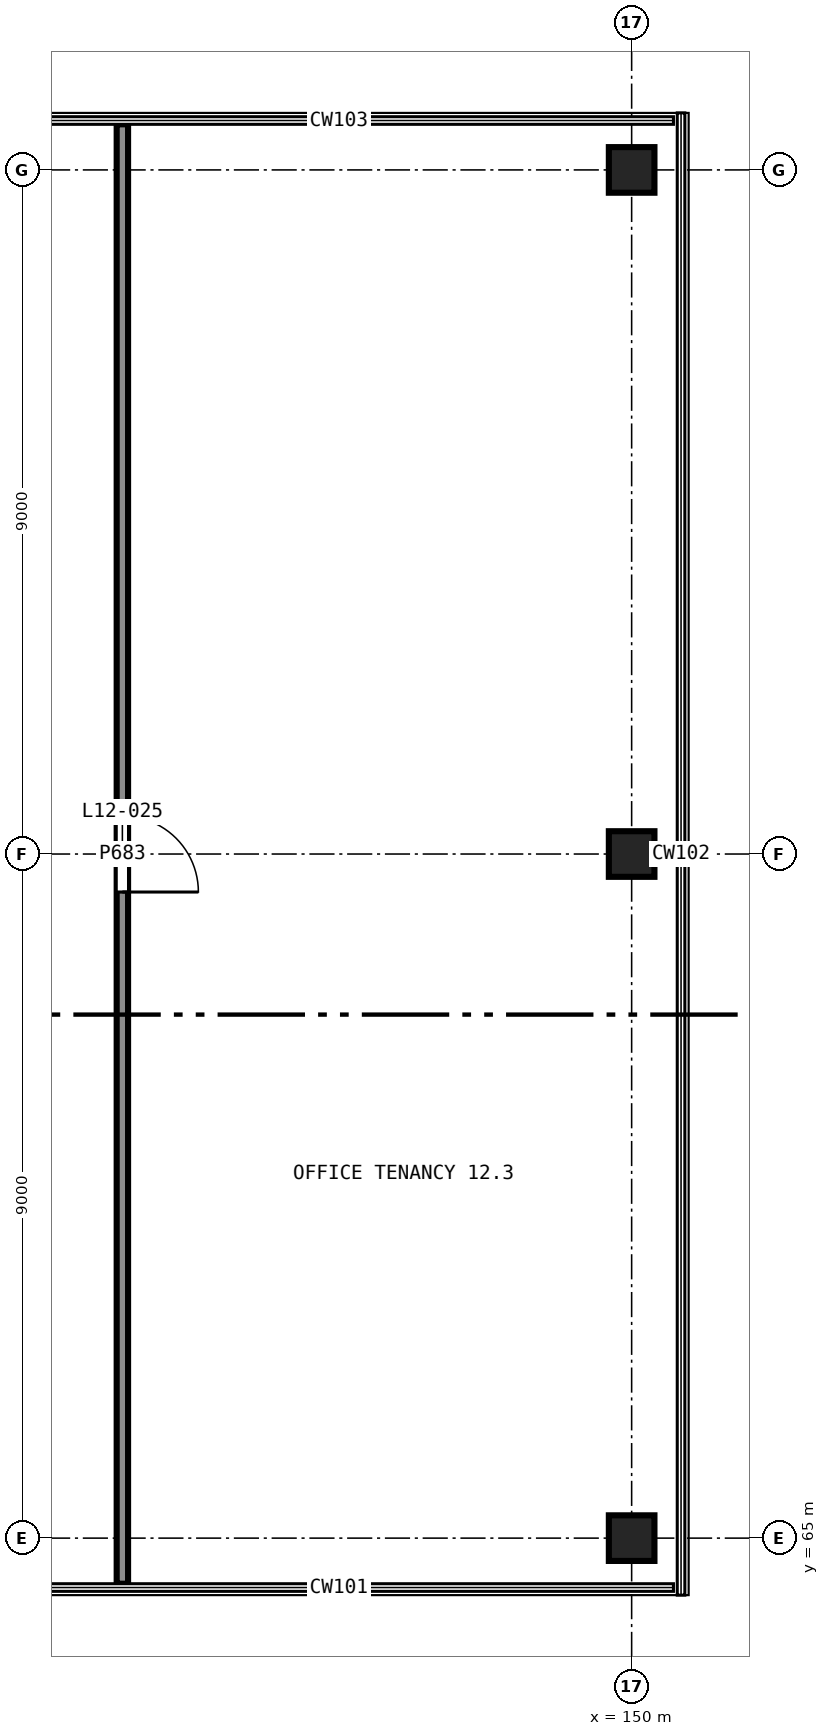
"""IFC4 building model, lengths in metres.
Left out: names, types, materials, properties, quantities, classifications, styles, units other than length and angle.
Written with IfcOpenShell. Run it as: python <this file> out.ifc"""

import sys

from ifc_helpers import new_model, si_unit, direction, frame, frame_2d, origin, origin_2d, place, context, subcontext, project, spatial, rectangle, extrude, element, fill, save


model = new_model("IFC4")
c1 = context("Model", 3, precision=1e-05, world=origin(), true_north=direction((0.0, 1.0)))
c2 = subcontext(c1, "Body", "Model", "MODEL_VIEW")
j1 = project(units=[si_unit("LENGTHUNIT", "METRE"), si_unit("PLANEANGLEUNIT", "RADIAN")], contexts=[c1])
p1 = place(None, origin())
s1 = spatial("IfcSite", under=j1, at=p1, CompositionType="ELEMENT")
p2 = place(p1, origin())
s2 = spatial("IfcBuilding", under=s1, at=p2, CompositionType="ELEMENT")
p3 = place(p2, frame((0.0, 0.0, 49.5)))
s3 = spatial("IfcBuildingStorey", under=s2, at=p3, CompositionType="ELEMENT", Elevation=49.5)
for number, where, z_axis, x_axis in (
    (1, (150.0, 65.0, 0.0), (0.0, 0.0, 1.0), (1.0, 0.0, 0.0)),
    (2, (150.0, 74.0, 0.0), (0.0, 0.0, 1.0), (1.0, 0.0, 0.0)),
    (3, (150.0, 83.0, 0.0), (0.0, 0.0, 1.0), (1.0, 0.0, 0.0)),
):
    element("IfcColumn", number, at=place(p3, frame(where, z_axis=z_axis, x_axis=x_axis)), inside=s3, PredefinedType="COLUMN", context=c2, shape_type="SweptSolid", body=[
        extrude(rectangle(XDim=0.6, YDim=0.6, at=origin_2d()), origin(), (0.0, 0.0, 1.0), 4.0),
    ])
p4 = place(p3, frame((143.3, 83.6, 0.0), z_axis=(0.0, 0.0, 1.0), x_axis=(0.0, -1.0, 0.0)))
e4 = element("IfcWall", 4, at=p4, inside=s3, PredefinedType="PARTITIONING", context=c2, shape_type="SweptSolid", body=[
    extrude(rectangle(XDim=19.2, YDim=0.15, at=frame_2d((9.6, 0.0))), origin(), (0.0, 0.0, 1.0), 3.58),
])
p5 = place(p4, frame((9.1, 0.0, 0.0)))
e5 = element("IfcOpeningElement", 5, at=p5, cuts=e4, PredefinedType="OPENING", context=c2, shape_type="SweptSolid", body=[
    extrude(rectangle(XDim=1.0, YDim=2.1, at=frame_2d((0.5, 1.05))), frame((0.0, 0.085, 0.0), z_axis=(0.0, -1.0, 0.0), x_axis=(1.0, 0.0, 0.0)), (0.0, 0.0, 1.0), 0.17),
])
p6 = place(p5, origin())
e6 = element("IfcDoor", 6, at=p6, inside=s3, OperationType="SINGLE_SWING_LEFT", PredefinedType="DOOR", context=c2, shape_type="SweptSolid", body=[
    extrude(rectangle(XDim=1.0, YDim=2.1, at=frame_2d((0.5, 1.05))), frame((0.0, 0.025, 0.0), z_axis=(0.0, -1.0, 0.0), x_axis=(1.0, 0.0, 0.0)), (0.0, 0.0, 1.0), 0.05),
])
fill(e5, e6)
save(model, sys.argv[1])
